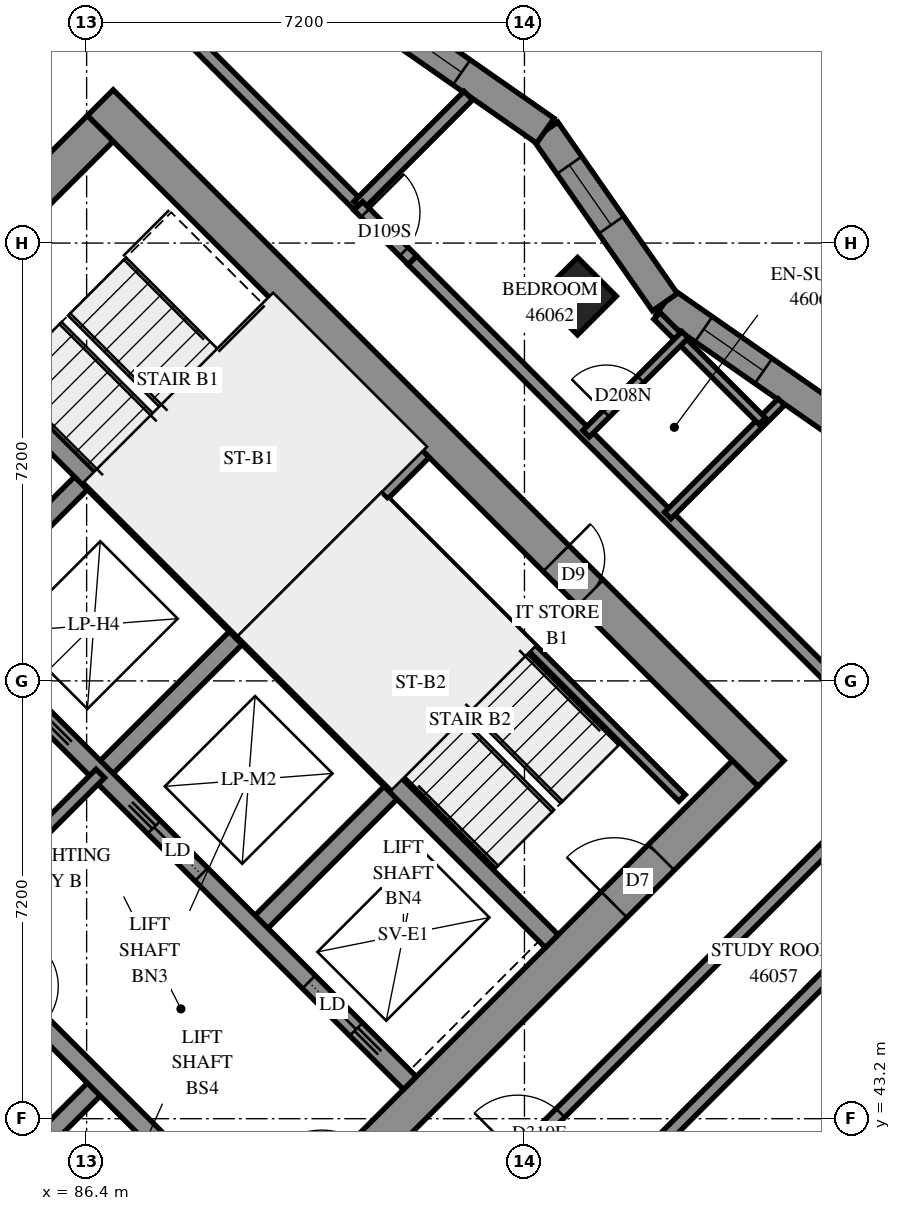
"""IFC4 building model, lengths in metres.
Left out: names, types, materials, properties, quantities, classifications, styles, units other than length and angle.
Written with IfcOpenShell. Run it as: python <this file> out.ifc"""

import sys

from ifc_helpers import new_model, si_unit, direction, frame, frame_2d, origin, origin_2d, place, context, subcontext, project, spatial, polyline, rectangle, outline, extrude, element, fill, save


model = new_model("IFC4")
c1 = context("Model", 3, precision=1e-05, world=origin(), true_north=direction((0.0, 1.0)))
c2 = subcontext(c1, "Body", "Model", "MODEL_VIEW")
j1 = project(units=[si_unit("LENGTHUNIT", "METRE"), si_unit("PLANEANGLEUNIT", "RADIAN")], contexts=[c1])
p1 = place(None, origin())
s1 = spatial("IfcSite", under=j1, at=p1, CompositionType="ELEMENT")
p2 = place(p1, origin())
s2 = spatial("IfcBuilding", under=s1, at=p2, CompositionType="ELEMENT")
p3 = place(p2, frame((0.0, 0.0, 169.4)))
s3 = spatial("IfcBuildingStorey", under=s2, at=p3, CompositionType="ELEMENT", Elevation=169.4)
p4 = place(p3, frame((94.474, 56.727, 0.0), z_axis=(0.0, 0.0, 1.0), x_axis=(0.7071067812, -0.7071067812, 0.0)))
e1 = element("IfcColumn", 1, at=p4, inside=s3, PredefinedType="COLUMN", context=c2, shape_type="SweptSolid", body=[
    extrude(rectangle(XDim=0.9, YDim=0.9, at=origin_2d()), origin(), (0.0, 0.0, 1.0), 3.1),
])
p5 = place(p3, frame((76.018, 49.302, -0.3), z_axis=(0.0, 0.0, 1.0), x_axis=(0.7071067812, -0.7071067812, 0.0)))
e2 = element("IfcWall", 2, at=p5, inside=s3, PredefinedType="SHEAR", context=c2, shape_type="SweptSolid", body=[
    extrude(rectangle(XDim=15.6, YDim=0.6, at=frame_2d((7.8, 0.0))), origin(), (0.0, 0.0, 1.0), 2.7),
])
p6 = place(p3, frame((86.625, 59.908, -0.3), z_axis=(0.0, 0.0, 1.0), x_axis=(0.7071067812, -0.7071067812, 0.0)))
e3 = element("IfcWall", 3, at=p6, inside=s3, PredefinedType="SHEAR", context=c2, shape_type="SweptSolid", body=[
    extrude(rectangle(XDim=15.6, YDim=0.6, at=frame_2d((7.8, 0.0))), origin(), (0.0, 0.0, 1.0), 2.7),
])
p7 = place(p6, frame((10.6, 0.0, 0.3)))
e4 = element("IfcOpeningElement", 4, at=p7, cuts=e3, PredefinedType="OPENING", context=c2, shape_type="SweptSolid", body=[
    extrude(rectangle(XDim=0.8, YDim=2.1, at=frame_2d((0.4, 1.05))), frame((0.0, 0.31, 0.0), z_axis=(0.0, -1.0, 0.0), x_axis=(1.0, 0.0, 0.0)), (0.0, 0.0, 1.0), 0.62),
])
p8 = place(p3, frame((76.442, 49.302, -0.3), z_axis=(0.0, 0.0, 1.0), x_axis=(0.7071067812, 0.7071067812, 0.0)))
e5 = element("IfcWall", 5, at=p8, inside=s3, PredefinedType="SHEAR", context=c2, shape_type="SweptSolid", body=[
    extrude(rectangle(XDim=14.4, YDim=0.6, at=frame_2d((7.2, 0.0))), origin(), (0.0, 0.0, 1.0), 2.7),
])
p9 = place(p8, frame((4.55, 0.0, 0.3)))
e6 = element("IfcOpeningElement", 6, at=p9, cuts=e5, PredefinedType="OPENING", context=c2, shape_type="SweptSolid", body=[
    extrude(rectangle(XDim=1.1, YDim=2.1, at=frame_2d((0.55, 1.05))), frame((0.0, 0.31, 0.0), z_axis=(0.0, -1.0, 0.0), x_axis=(1.0, 0.0, 0.0)), (0.0, 0.0, 1.0), 0.62),
])
p10 = place(p8, frame((11.35, 0.0, 0.3)))
e7 = element("IfcOpeningElement", 7, at=p10, cuts=e5, PredefinedType="OPENING", context=c2, shape_type="SweptSolid", body=[
    extrude(rectangle(XDim=1.1, YDim=2.1, at=frame_2d((0.55, 1.05))), frame((0.0, 0.31, 0.0), z_axis=(0.0, -1.0, 0.0), x_axis=(1.0, 0.0, 0.0)), (0.0, 0.0, 1.0), 0.62),
])
p11 = place(p3, frame((87.049, 38.695, -0.3), z_axis=(0.0, 0.0, 1.0), x_axis=(0.7071067812, 0.7071067812, 0.0)))
e8 = element("IfcWall", 8, at=p11, inside=s3, PredefinedType="SHEAR", context=c2, shape_type="SweptSolid", body=[
    extrude(rectangle(XDim=14.4, YDim=0.6, at=frame_2d((7.2, 0.0))), origin(), (0.0, 0.0, 1.0), 2.7),
])
p12 = place(p11, frame((4.55, 0.0, 0.3)))
e9 = element("IfcOpeningElement", 9, at=p12, cuts=e8, PredefinedType="OPENING", context=c2, shape_type="SweptSolid", body=[
    extrude(rectangle(XDim=1.1, YDim=2.1, at=frame_2d((0.55, 1.05))), frame((0.0, 0.31, 0.0), z_axis=(0.0, -1.0, 0.0), x_axis=(1.0, 0.0, 0.0)), (0.0, 0.0, 1.0), 0.62),
])
p13 = place(p11, frame((11.35, 0.0, 0.3)))
e10 = element("IfcOpeningElement", 10, at=p13, cuts=e8, PredefinedType="OPENING", context=c2, shape_type="SweptSolid", body=[
    extrude(rectangle(XDim=1.1, YDim=2.1, at=frame_2d((0.55, 1.05))), frame((0.0, 0.31, 0.0), z_axis=(0.0, -1.0, 0.0), x_axis=(1.0, 0.0, 0.0)), (0.0, 0.0, 1.0), 0.62),
])
p14 = place(p3, frame((84.079, 51.423, 0.0), z_axis=(0.0, 0.0, 1.0), x_axis=(0.7071219326, 0.7070916295, 0.0)))
e11 = element("IfcWall", 11, at=p14, inside=s3, PredefinedType="SOLIDWALL", context=c2, shape_type="SweptSolid", body=[
    extrude(rectangle(XDim=3.3, YDim=0.3, at=frame_2d((1.65, 0.0))), origin(), (0.0, 0.0, 1.0), 3.1),
])
p15 = place(p3, frame((86.625, 48.878, 0.0), z_axis=(0.0, 0.0, 1.0), x_axis=(0.7071067812, 0.7071067812, 0.0)))
e12 = element("IfcWall", 12, at=p15, inside=s3, PredefinedType="SOLIDWALL", context=c2, shape_type="SweptSolid", body=[
    extrude(rectangle(XDim=3.3, YDim=0.3, at=frame_2d((1.65, 0.0))), origin(), (0.0, 0.0, 1.0), 3.1),
])
p16 = place(p3, frame((84.291, 41.453, 0.0), z_axis=(0.0, 0.0, 1.0), x_axis=(0.7071067812, 0.7071067812, 0.0)))
e13 = element("IfcWall", 13, at=p16, inside=s3, PredefinedType="SOLIDWALL", context=c2, shape_type="SweptSolid", body=[
    extrude(rectangle(XDim=3.3, YDim=0.3, at=frame_2d((1.65, 0.0))), origin(), (0.0, 0.0, 1.0), 3.1),
])
p17 = place(p3, frame((89.17, 46.332, 0.0), z_axis=(0.0, 0.0, 1.0), x_axis=(0.7071067812, 0.7071067812, 0.0)))
e14 = element("IfcWall", 14, at=p17, inside=s3, PredefinedType="SOLIDWALL", context=c2, shape_type="SweptSolid", body=[
    extrude(rectangle(XDim=3.3, YDim=0.3, at=frame_2d((1.65, 0.0))), origin(), (0.0, 0.0, 1.0), 3.1),
])
p18 = place(p3, frame((78.988, 51.423, 0.0), z_axis=(0.0, 0.0, 1.0), x_axis=(0.7071067812, -0.7071067812, 0.0)))
e15 = element("IfcWall", 15, at=p18, inside=s3, PredefinedType="SOLIDWALL", context=c2, shape_type="SweptSolid", body=[
    extrude(rectangle(XDim=14.4, YDim=0.3, at=frame_2d((7.2, 0.0))), origin(), (0.0, 0.0, 1.0), 3.1),
])
p19 = place(p18, frame((1.35, 0.0, 0.0)))
e16 = element("IfcOpeningElement", 16, at=p19, cuts=e15, PredefinedType="OPENING", context=c2, shape_type="SweptSolid", body=[
    extrude(rectangle(XDim=0.9, YDim=2.1, at=frame_2d((0.45, 1.05))), frame((0.0, 0.16, 0.0), z_axis=(0.0, -1.0, 0.0), x_axis=(1.0, 0.0, 0.0)), (0.0, 0.0, 1.0), 0.32),
])
p20 = place(p18, frame((4.95, 0.0, 0.0)))
e17 = element("IfcOpeningElement", 17, at=p20, cuts=e15, PredefinedType="OPENING", context=c2, shape_type="SweptSolid", body=[
    extrude(rectangle(XDim=0.9, YDim=2.1, at=frame_2d((0.45, 1.05))), frame((0.0, 0.16, 0.0), z_axis=(0.0, -1.0, 0.0), x_axis=(1.0, 0.0, 0.0)), (0.0, 0.0, 1.0), 0.32),
])
p21 = place(p18, frame((8.55, 0.0, 0.0)))
e18 = element("IfcOpeningElement", 18, at=p21, cuts=e15, PredefinedType="OPENING", context=c2, shape_type="SweptSolid", body=[
    extrude(rectangle(XDim=0.9, YDim=2.1, at=frame_2d((0.45, 1.05))), frame((0.0, 0.16, 0.0), z_axis=(0.0, -1.0, 0.0), x_axis=(1.0, 0.0, 0.0)), (0.0, 0.0, 1.0), 0.32),
])
p22 = place(p18, frame((12.05, 0.0, 0.0)))
e19 = element("IfcOpeningElement", 19, at=p22, cuts=e15, PredefinedType="OPENING", context=c2, shape_type="SweptSolid", body=[
    extrude(rectangle(XDim=1.1, YDim=2.1, at=frame_2d((0.55, 1.05))), frame((0.0, 0.16, 0.0), z_axis=(0.0, -1.0, 0.0), x_axis=(1.0, 0.0, 0.0)), (0.0, 0.0, 1.0), 0.32),
])
p23 = place(p3, frame((81.534, 53.969, 0.0), z_axis=(0.0, 0.0, 1.0), x_axis=(0.707103309, -0.7071102534, 0.0)))
e20 = element("IfcWall", 20, at=p23, inside=s3, PredefinedType="SOLIDWALL", context=c2, shape_type="SweptSolid", body=[
    extrude(rectangle(XDim=14.4, YDim=0.3, at=frame_2d((7.2, 0.0))), origin(), (0.0, 0.0, 1.0), 3.1),
])
p24 = place(p23, frame((1.25, 0.0, 0.0)))
e21 = element("IfcOpeningElement", 21, at=p24, cuts=e20, PredefinedType="OPENING", context=c2, shape_type="SweptSolid", body=[
    extrude(rectangle(XDim=1.1, YDim=2.1, at=frame_2d((0.55, 1.05))), frame((0.0, 0.16, 0.0), z_axis=(0.0, -1.0, 0.0), x_axis=(1.0, 0.0, 0.0)), (0.0, 0.0, 1.0), 0.32),
])
p25 = place(p23, frame((4.85, 0.0, 0.0)))
e22 = element("IfcOpeningElement", 22, at=p25, cuts=e20, PredefinedType="OPENING", context=c2, shape_type="SweptSolid", body=[
    extrude(rectangle(XDim=1.1, YDim=2.1, at=frame_2d((0.55, 1.05))), frame((0.0, 0.16, 0.0), z_axis=(0.0, -1.0, 0.0), x_axis=(1.0, 0.0, 0.0)), (0.0, 0.0, 1.0), 0.32),
])
p26 = place(p23, frame((8.45, 0.0, 0.0)))
e23 = element("IfcOpeningElement", 23, at=p26, cuts=e20, PredefinedType="OPENING", context=c2, shape_type="SweptSolid", body=[
    extrude(rectangle(XDim=1.1, YDim=2.1, at=frame_2d((0.55, 1.05))), frame((0.0, 0.16, 0.0), z_axis=(0.0, -1.0, 0.0), x_axis=(1.0, 0.0, 0.0)), (0.0, 0.0, 1.0), 0.32),
])
p27 = place(p23, frame((12.05, 0.0, 0.0)))
e24 = element("IfcOpeningElement", 24, at=p27, cuts=e20, PredefinedType="OPENING", context=c2, shape_type="SweptSolid", body=[
    extrude(rectangle(XDim=1.1, YDim=2.1, at=frame_2d((0.55, 1.05))), frame((0.0, 0.16, 0.0), z_axis=(0.0, -1.0, 0.0), x_axis=(1.0, 0.0, 0.0)), (0.0, 0.0, 1.0), 0.32),
])
for number, where, z_axis, x_axis in (
    (25, (83.867, 56.302, 0.0), (0.0, 0.0, 1.0), (0.707, -0.707, 0.0)),
    (26, (88.958, 51.211, 0.0), (0.0, 0.0, 1.0), (0.707, -0.707, 0.0)),
):
    element("IfcWall", number, at=place(p3, frame(where, z_axis=z_axis, x_axis=x_axis)), inside=s3, PredefinedType="SOLIDWALL", context=c2, shape_type="SweptSolid", body=[
        extrude(rectangle(XDim=7.2, YDim=0.3, at=frame_2d((3.6, 0.0))), origin(), (0.0, 0.0, 1.0), 3.1),
    ])
p28 = place(p3, frame((88.958, 51.211, 0.0), z_axis=(0.0, 0.0, 1.0), x_axis=(0.7071067812, 0.7071067812, 0.0)))
e27 = element("IfcWall", 27, at=p28, inside=s3, PredefinedType="SOLIDWALL", context=c2, shape_type="SweptSolid", body=[
    extrude(rectangle(XDim=4.2, YDim=0.3, at=frame_2d((2.1, 0.0))), origin(), (0.0, 0.0, 1.0), 3.1),
])
p29 = place(p3, frame((98.728, 54.662, 0.0), z_axis=(0.0, 0.0, 1.0), x_axis=(-0.8202082464, 0.5720650597, 0.0)))
e28 = element("IfcWall", 28, at=p29, inside=s3, PredefinedType="SOLIDWALL", context=c2, shape_type="SweptSolid", body=[
    extrude(outline(polyline([(-0.045, -0.25), (3.392, -0.25), (3.481, 0.25), (0.045, 0.25), (-0.045, -0.25)])), origin(), (0.0, 0.0, 1.0), 3.1),
])
p30 = place(p29, frame((1.459, 0.0, 0.45)))
e29 = element("IfcOpeningElement", 29, at=p30, cuts=e28, PredefinedType="OPENING", context=c2, shape_type="SweptSolid", body=[
    extrude(rectangle(XDim=1.2, YDim=2.5, at=frame_2d((0.6, 1.25))), frame((0.0, 0.26, 0.0), z_axis=(0.0, -1.0, 0.0), x_axis=(1.0, 0.0, 0.0)), (0.0, 0.0, 1.0), 0.52),
])
p31 = place(p3, frame((95.91, 56.628, 0.0), z_axis=(0.0, 0.0, 1.0), x_axis=(-0.5720591366, 0.8202123775, 0.0)))
e30 = element("IfcWall", 30, at=p31, inside=s3, PredefinedType="SOLIDWALL", context=c2, shape_type="SweptSolid", body=[
    extrude(outline(polyline([(0.045, -0.25), (3.481, -0.25), (3.392, 0.25), (-0.045, 0.25), (0.045, -0.25)])), origin(), (0.0, 0.0, 1.0), 3.1),
])
p32 = place(p31, frame((1.547, 0.0, 0.45)))
e31 = element("IfcOpeningElement", 31, at=p32, cuts=e30, PredefinedType="OPENING", context=c2, shape_type="SweptSolid", body=[
    extrude(rectangle(XDim=1.2, YDim=2.5, at=frame_2d((0.6, 1.25))), frame((0.0, 0.26, 0.0), z_axis=(0.0, -1.0, 0.0), x_axis=(1.0, 0.0, 0.0)), (0.0, 0.0, 1.0), 0.52),
])
p33 = place(p3, frame((93.944, 59.447, 0.0), z_axis=(0.0, 0.0, 1.0), x_axis=(-0.8202082464, 0.5720650597, 0.0)))
e32 = element("IfcWall", 32, at=p33, inside=s3, PredefinedType="SOLIDWALL", context=c2, shape_type="SweptSolid", body=[
    extrude(outline(polyline([(-0.045, -0.25), (3.392, -0.25), (3.481, 0.25), (0.045, 0.25), (-0.045, -0.25)])), origin(), (0.0, 0.0, 1.0), 3.1),
])
p34 = place(p33, frame((1.68, 0.0, 0.45)))
e33 = element("IfcOpeningElement", 33, at=p34, cuts=e32, PredefinedType="OPENING", context=c2, shape_type="SweptSolid", body=[
    extrude(rectangle(XDim=1.2, YDim=2.5, at=frame_2d((0.6, 1.25))), frame((0.0, 0.26, 0.0), z_axis=(0.0, -1.0, 0.0), x_axis=(1.0, 0.0, 0.0)), (0.0, 0.0, 1.0), 0.52),
])
p35 = place(p3, frame((91.313, 53.354, 0.0), z_axis=(0.0, 0.0, 1.0), x_axis=(0.7071140275, -0.7070995348, 0.0)))
e34 = element("IfcWall", 34, at=p35, inside=s3, PredefinedType="PARTITIONING", context=c2, shape_type="SweptSolid", body=[
    extrude(rectangle(XDim=6.9, YDim=0.15, at=frame_2d((3.45, 0.0))), origin(), (0.0, 0.0, 1.0), 3.1),
])
p36 = place(p3, frame((84.079, 46.332, 0.0), z_axis=(0.0, 0.0, 1.0), x_axis=(0.7071067812, 0.7071067812, 0.0)))
e35 = element("IfcWall", 35, at=p36, inside=s3, PredefinedType="PARTITIONING", context=c2, shape_type="SweptSolid", body=[
    extrude(rectangle(XDim=3.6, YDim=0.2, at=frame_2d((1.8, 0.0))), origin(), (0.0, 0.0, 1.0), 3.1),
])
p37 = place(p3, frame((94.366, 41.348, 0.0), z_axis=(0.0, 0.0, 1.0), x_axis=(0.7071108904, 0.707102672, 0.0)))
e36 = element("IfcWall", 36, at=p37, inside=s3, PredefinedType="PARTITIONING", context=c2, shape_type="SweptSolid", body=[
    extrude(rectangle(XDim=12.168, YDim=0.2, at=frame_2d((6.084, 0.0))), origin(), (0.0, 0.0, 1.0), 3.1),
])
p38 = place(p3, frame((91.755, 57.317, 0.0), z_axis=(0.0, 0.0, 1.0), x_axis=(0.7071067812, -0.7071067812, 0.0)))
e37 = element("IfcWall", 37, at=p38, inside=s3, PredefinedType="PARTITIONING", context=c2, shape_type="SweptSolid", body=[
    extrude(rectangle(XDim=11.639, YDim=0.2, at=frame_2d((5.819, 0.0))), origin(), (0.0, 0.0, 1.0), 3.1),
])
p39 = place(p3, frame((80.154, 55.56, 0.0), z_axis=(0.0, 0.0, 1.0), x_axis=(0.7071067812, 0.7071067812, 0.0)))
e38 = element("IfcWall", 38, at=p39, inside=s3, PredefinedType="PARTITIONING", context=c2, shape_type="SweptSolid", body=[
    extrude(rectangle(XDim=9.45, YDim=0.2, at=frame_2d((4.725, 0.0))), origin(), (0.0, 0.0, 1.0), 3.1),
])
p40 = place(p39, frame((0.292, 0.0, 0.0)))
e39 = element("IfcOpeningElement", 39, at=p40, cuts=e38, PredefinedType="OPENING", context=c2, shape_type="SweptSolid", body=[
    extrude(rectangle(XDim=1.0, YDim=2.1, at=frame_2d((0.5, 1.05))), frame((0.0, 0.11, 0.0), z_axis=(0.0, -1.0, 0.0), x_axis=(1.0, 0.0, 0.0)), (0.0, 0.0, 1.0), 0.22),
])
p41 = place(p3, frame((93.306, 42.408, 0.0), z_axis=(0.0, 0.0, 1.0), x_axis=(0.7071067812, 0.7071067812, 0.0)))
e40 = element("IfcWall", 40, at=p41, inside=s3, PredefinedType="PARTITIONING", context=c2, shape_type="SweptSolid", body=[
    extrude(rectangle(XDim=9.45, YDim=0.2, at=frame_2d((4.725, 0.0))), origin(), (0.0, 0.0, 1.0), 3.1),
])
p42 = place(p41, frame((0.253, 0.0, 0.0)))
e41 = element("IfcOpeningElement", 41, at=p42, cuts=e40, PredefinedType="OPENING", context=c2, shape_type="SweptSolid", body=[
    extrude(rectangle(XDim=1.0, YDim=2.1, at=frame_2d((0.5, 1.05))), frame((0.0, 0.11, 0.0), z_axis=(0.0, -1.0, 0.0), x_axis=(1.0, 0.0, 0.0)), (0.0, 0.0, 1.0), 0.22),
])
p43 = place(p3, frame((86.841, 62.245, 0.0), z_axis=(0.0, 0.0, 1.0), x_axis=(0.7071067812, -0.7071067812, 0.0)))
e42 = element("IfcWall", 42, at=p43, inside=s3, PredefinedType="PARTITIONING", context=c2, shape_type="SweptSolid", body=[
    extrude(rectangle(XDim=5.699, YDim=0.2, at=frame_2d((2.85, 0.0))), origin(), (0.0, 0.0, 1.0), 3.1),
])
p44 = place(p3, frame((95.957, 53.121, 0.0), z_axis=(0.0, 0.0, 1.0), x_axis=(0.7070878465, 0.7071257154, 0.0)))
e43 = element("IfcWall", 43, at=p44, inside=s3, PredefinedType="PARTITIONING", context=c2, shape_type="SweptSolid", body=[
    extrude(rectangle(XDim=2.641, YDim=0.15, at=frame_2d((1.32, 0.0))), origin(), (0.0, 0.0, 1.0), 3.1),
])
p45 = place(p3, frame((90.867, 58.213, 0.0), z_axis=(0.0, 0.0, 1.0), x_axis=(0.7066186165, 0.7075946091, 0.0)))
e44 = element("IfcWall", 44, at=p45, inside=s3, PredefinedType="PARTITIONING", context=c2, shape_type="SweptSolid", body=[
    extrude(rectangle(XDim=2.562, YDim=0.2, at=frame_2d((1.281, 0.0))), origin(), (0.0, 0.0, 1.0), 3.1),
])
p46 = place(p3, frame((95.781, 56.402, 0.0), z_axis=(0.0, 0.0, 1.0), x_axis=(0.7071067812, -0.7071067812, 0.0)))
e45 = element("IfcWall", 45, at=p46, inside=s3, PredefinedType="PARTITIONING", context=c2, shape_type="SweptSolid", body=[
    extrude(rectangle(XDim=2.446, YDim=0.15, at=frame_2d((1.223, 0.0))), origin(), (0.0, 0.0, 1.0), 3.1),
])
p47 = place(p3, frame((94.614, 54.464, 0.0), z_axis=(0.0, 0.0, 1.0), x_axis=(0.7070850605, 0.7071285012, 0.0)))
e46 = element("IfcWall", 46, at=p47, inside=s3, PredefinedType="PARTITIONING", context=c2, shape_type="SweptSolid", body=[
    extrude(rectangle(XDim=2.302, YDim=0.15, at=frame_2d((1.151, 0.0))), origin(), (0.0, 0.0, 1.0), 3.1),
])
p48 = place(p47, frame((0.466, 0.0, 0.0)))
e47 = element("IfcOpeningElement", 47, at=p48, cuts=e46, PredefinedType="OPENING", context=c2, shape_type="SweptSolid", body=[
    extrude(rectangle(XDim=0.8, YDim=2.1, at=frame_2d((0.4, 1.05))), frame((0.0, 0.085, 0.0), z_axis=(0.0, -1.0, 0.0), x_axis=(1.0, 0.0, 0.0)), (0.0, 0.0, 1.0), 0.17),
])
p49 = place(p3, frame((90.867, 58.211, 0.0), z_axis=(0.0, 0.0, 1.0), x_axis=(0.706312726, -0.7078999456, 0.0)))
e48 = element("IfcWall", 48, at=p49, inside=s3, PredefinedType="PARTITIONING", context=c2, shape_type="SweptSolid", body=[
    extrude(rectangle(XDim=1.26, YDim=0.2, at=frame_2d((0.63, 0.0))), origin(), (0.0, 0.0, 1.0), 3.1),
])
p50 = place(p49, frame((0.162, 0.0, 0.0)))
e49 = element("IfcOpeningElement", 49, at=p50, cuts=e48, PredefinedType="OPENING", context=c2, shape_type="SweptSolid", body=[
    extrude(rectangle(XDim=0.9, YDim=2.1, at=frame_2d((0.45, 1.05))), frame((0.0, 0.11, 0.0), z_axis=(0.0, -1.0, 0.0), x_axis=(1.0, 0.0, 0.0)), (0.0, 0.0, 1.0), 0.22),
])
p51 = place(p30, origin())
e50 = element("IfcWindow", 50, at=p51, inside=s3, PartitioningType="SINGLE_PANEL", PredefinedType="WINDOW", context=c2, shape_type="SweptSolid", body=[
    extrude(rectangle(XDim=1.2, YDim=2.5, at=frame_2d((0.6, 1.25))), frame((0.0, 0.18, 0.0), z_axis=(0.0, -1.0, 0.0), x_axis=(1.0, 0.0, 0.0)), (0.0, 0.0, 1.0), 0.06),
])
fill(e29, e50)
p52 = place(p32, origin())
e51 = element("IfcWindow", 51, at=p52, inside=s3, PartitioningType="SINGLE_PANEL", PredefinedType="WINDOW", context=c2, shape_type="SweptSolid", body=[
    extrude(rectangle(XDim=1.2, YDim=2.5, at=frame_2d((0.6, 1.25))), frame((0.0, 0.18, 0.0), z_axis=(0.0, -1.0, 0.0), x_axis=(1.0, 0.0, 0.0)), (0.0, 0.0, 1.0), 0.06),
])
fill(e31, e51)
p53 = place(p34, origin())
e52 = element("IfcWindow", 52, at=p53, inside=s3, PartitioningType="SINGLE_PANEL", PredefinedType="WINDOW", context=c2, shape_type="SweptSolid", body=[
    extrude(rectangle(XDim=1.2, YDim=2.5, at=frame_2d((0.6, 1.25))), frame((0.0, 0.18, 0.0), z_axis=(0.0, -1.0, 0.0), x_axis=(1.0, 0.0, 0.0)), (0.0, 0.0, 1.0), 0.06),
])
fill(e33, e52)
p54 = place(p7, origin())
e53 = element("IfcDoor", 53, at=p54, inside=s3, OperationType="SINGLE_SWING_RIGHT", PredefinedType="DOOR", context=c2, shape_type="SweptSolid", body=[
    extrude(rectangle(XDim=0.8, YDim=2.1, at=frame_2d((0.4, 1.05))), frame((0.0, 0.025, 0.0), z_axis=(0.0, -1.0, 0.0), x_axis=(1.0, 0.0, 0.0)), (0.0, 0.0, 1.0), 0.05),
])
fill(e4, e53)
p55 = place(p13, origin())
e54 = element("IfcDoor", 54, at=p55, inside=s3, OperationType="SINGLE_SWING_RIGHT", PredefinedType="DOOR", context=c2, shape_type="SweptSolid", body=[
    extrude(rectangle(XDim=1.1, YDim=2.1, at=frame_2d((0.55, 1.05))), frame((0.0, 0.025, 0.0), z_axis=(0.0, -1.0, 0.0), x_axis=(1.0, 0.0, 0.0)), (0.0, 0.0, 1.0), 0.05),
])
fill(e10, e54)
p56 = place(p26, origin())
e55 = element("IfcDoor", 55, at=p56, inside=s3, OperationType="SLIDING_TO_LEFT", PredefinedType="DOOR", context=c2, shape_type="SweptSolid", body=[
    extrude(rectangle(XDim=1.1, YDim=2.1, at=frame_2d((0.55, 1.05))), frame((0.0, 0.025, 0.0), z_axis=(0.0, -1.0, 0.0), x_axis=(1.0, 0.0, 0.0)), (0.0, 0.0, 1.0), 0.05),
])
fill(e23, e55)
p57 = place(p27, origin())
e56 = element("IfcDoor", 56, at=p57, inside=s3, OperationType="SLIDING_TO_RIGHT", PredefinedType="DOOR", context=c2, shape_type="SweptSolid", body=[
    extrude(rectangle(XDim=1.1, YDim=2.1, at=frame_2d((0.55, 1.05))), frame((0.0, 0.025, 0.0), z_axis=(0.0, -1.0, 0.0), x_axis=(1.0, 0.0, 0.0)), (0.0, 0.0, 1.0), 0.05),
])
fill(e24, e56)
p58 = place(p42, origin())
e57 = element("IfcDoor", 57, at=p58, inside=s3, OperationType="SINGLE_SWING_RIGHT", PredefinedType="DOOR", context=c2, shape_type="SweptSolid", body=[
    extrude(rectangle(XDim=1.0, YDim=2.1, at=frame_2d((0.5, 1.05))), frame((0.0, 0.025, 0.0), z_axis=(0.0, -1.0, 0.0), x_axis=(1.0, 0.0, 0.0)), (0.0, 0.0, 1.0), 0.05),
])
fill(e41, e57)
p59 = place(p50, origin())
e58 = element("IfcDoor", 58, at=p59, inside=s3, OperationType="SINGLE_SWING_RIGHT", PredefinedType="DOOR", context=c2, shape_type="SweptSolid", body=[
    extrude(rectangle(XDim=0.9, YDim=2.1, at=frame_2d((0.45, 1.05))), frame((0.0, 0.025, 0.0), z_axis=(0.0, -1.0, 0.0), x_axis=(1.0, 0.0, 0.0)), (0.0, 0.0, 1.0), 0.05),
])
fill(e49, e58)
p60 = place(p48, origin())
e59 = element("IfcDoor", 59, at=p60, inside=s3, OperationType="SINGLE_SWING_RIGHT", PredefinedType="DOOR", context=c2, shape_type="SweptSolid", body=[
    extrude(rectangle(XDim=0.8, YDim=2.1, at=frame_2d((0.4, 1.05))), frame((0.0, 0.025, 0.0), z_axis=(0.0, -1.0, 0.0), x_axis=(1.0, 0.0, 0.0)), (0.0, 0.0, 1.0), 0.05),
])
fill(e47, e59)
save(model, sys.argv[1])
